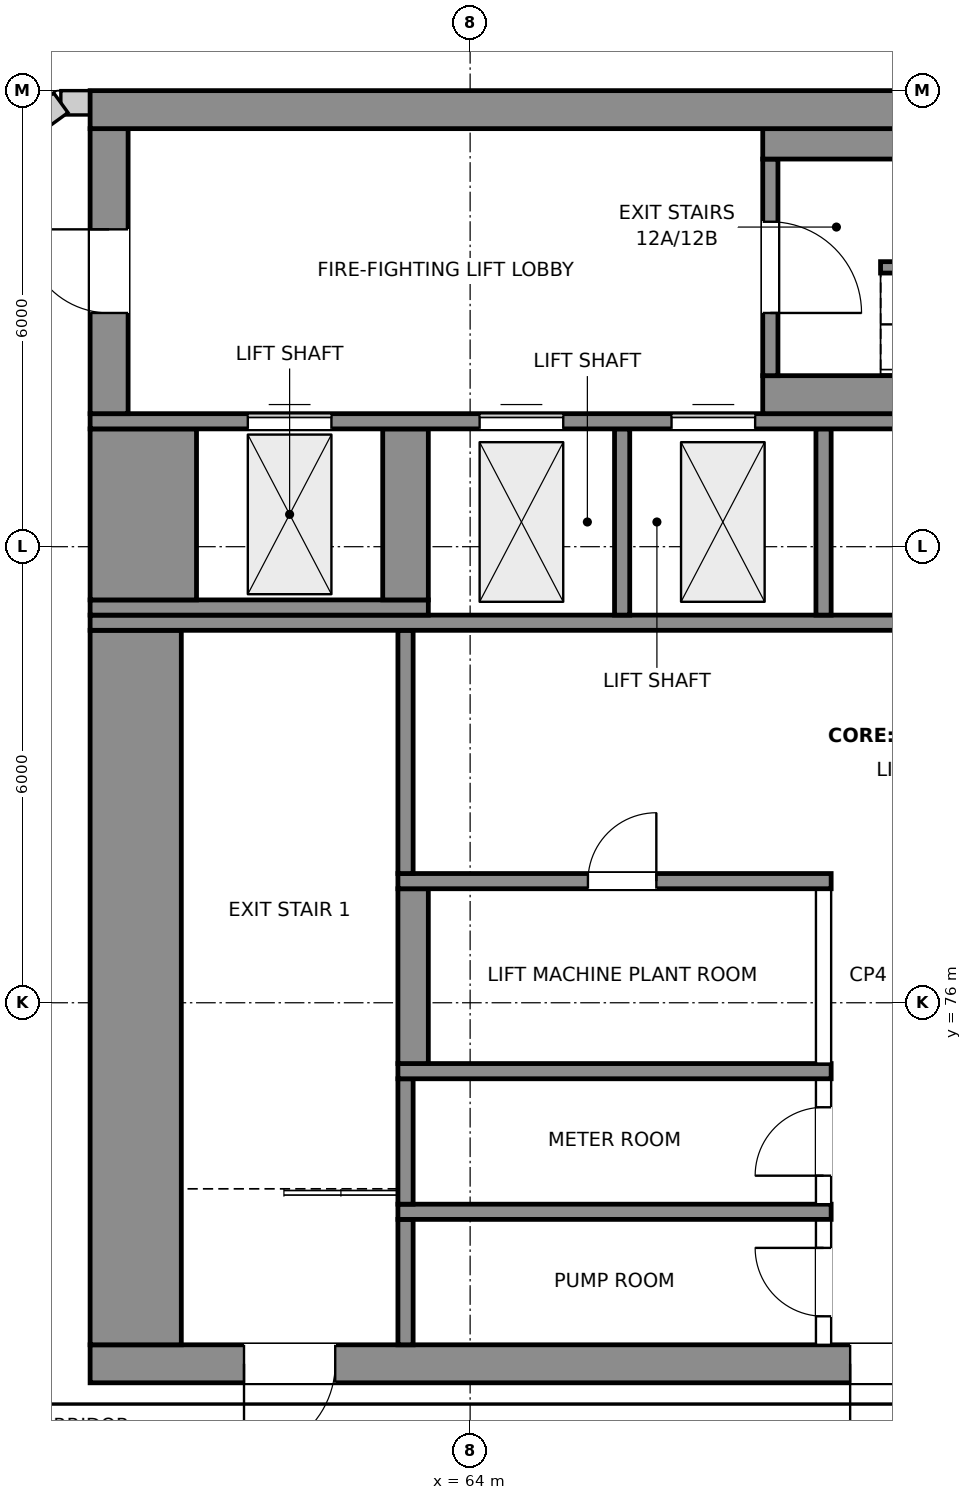
"""IFC4 building model, lengths in metres.
Left out: names, types, materials, properties, quantities, classifications, styles, units other than length and angle.
Written with IfcOpenShell. Run it as: python <this file> out.ifc"""

import sys

from ifc_helpers import new_model, si_unit, direction, frame, frame_2d, origin, place, context, subcontext, project, spatial, rectangle, extrude, element, fill, save


model = new_model("IFC4")
c1 = context("Model", 3, precision=1e-05, world=origin(), true_north=direction((0.0, 1.0)))
c2 = subcontext(c1, "Body", "Model", "MODEL_VIEW")
j1 = project(units=[si_unit("LENGTHUNIT", "METRE"), si_unit("PLANEANGLEUNIT", "RADIAN")], contexts=[c1])
p1 = place(None, origin())
s1 = spatial("IfcSite", under=j1, at=p1, CompositionType="ELEMENT")
p2 = place(p1, origin())
s2 = spatial("IfcBuilding", under=s1, at=p2, CompositionType="ELEMENT")
p3 = place(p2, frame((0.0, 0.0, 342.2)))
s3 = spatial("IfcBuildingStorey", under=s2, at=p3, CompositionType="ELEMENT", Elevation=342.2)
p4 = place(p3, frame((59.0, 87.84, 0.0), z_axis=(0.0, 0.0, 1.0), x_axis=(-1.0, 0.0, 0.0)))
e1 = element("IfcWall", 1, at=p4, inside=s3, PredefinedType="SOLIDWALL", context=c2, shape_type="SweptSolid", body=[
    extrude(rectangle(XDim=0.385, YDim=0.32, at=frame_2d((0.192, 0.0))), origin(), (0.0, 0.0, 1.0), 4.2),
])
p5 = place(p3, frame((58.615, 87.84, 0.0), z_axis=(0.0, 0.0, 1.0), x_axis=(-0.809027332235, -0.587771023186, 0.0)))
e2 = element("IfcWall", 2, at=p5, inside=s3, PredefinedType="SOLIDWALL", context=c2, shape_type="SweptSolid", body=[
    extrude(rectangle(XDim=4.53, YDim=0.32, at=frame_2d((2.265, 0.0))), origin(), (0.0, 0.0, 1.0), 4.2),
])
p6 = place(p3, frame((59.0, 71.25, 0.0), z_axis=(0.0, 0.0, 1.0), x_axis=(1.0, 0.0, 0.0)))
e3 = element("IfcWall", 3, at=p6, inside=s3, PredefinedType="SHEAR", context=c2, shape_type="SweptSolid", body=[
    extrude(rectangle(XDim=22.0, YDim=0.5, at=frame_2d((11.0, 0.0))), origin(), (0.0, 0.0, 1.0), 4.5),
])
p7 = place(p6, frame((2.025, 0.0, 0.0)))
e4 = element("IfcOpeningElement", 4, at=p7, cuts=e3, PredefinedType="OPENING", context=c2, shape_type="SweptSolid", body=[
    extrude(rectangle(XDim=1.2, YDim=2.1, at=frame_2d((0.6, 1.05))), frame((0.0, 0.26, 0.0), z_axis=(0.0, -1.0, 0.0), x_axis=(1.0, 0.0, 0.0)), (0.0, 0.0, 1.0), 0.52),
])
p8 = place(p6, frame((18.775, 0.0, 0.0)))
e5 = element("IfcOpeningElement", 5, at=p8, cuts=e3, PredefinedType="OPENING", context=c2, shape_type="SweptSolid", body=[
    extrude(rectangle(XDim=1.2, YDim=2.1, at=frame_2d((0.6, 1.05))), frame((0.0, 0.26, 0.0), z_axis=(0.0, -1.0, 0.0), x_axis=(1.0, 0.0, 0.0)), (0.0, 0.0, 1.0), 0.52),
])
p9 = place(p6, frame((10.0, 0.0, 0.0)))
e6 = element("IfcOpeningElement", 6, at=p9, cuts=e3, PredefinedType="OPENING", context=c2, shape_type="SweptSolid", body=[
    extrude(rectangle(XDim=2.0, YDim=2.1, at=frame_2d((1.0, 1.05))), frame((0.0, 0.26, 0.0), z_axis=(0.0, -1.0, 0.0), x_axis=(1.0, 0.0, 0.0)), (0.0, 0.0, 1.0), 0.52),
])
p10 = place(p3, frame((59.6, 71.5, 0.0), z_axis=(0.0, 0.0, 1.0), x_axis=(0.0, 1.0, 0.0)))
e7 = element("IfcWall", 7, at=p10, inside=s3, PredefinedType="SHEAR", context=c2, shape_type="SweptSolid", body=[
    extrude(rectangle(XDim=9.4, YDim=1.2, at=frame_2d((4.7, 0.0))), origin(), (0.0, 0.0, 1.0), 4.5),
])
p11 = place(p3, frame((63.15, 71.5, 0.0), z_axis=(0.0, 0.0, 1.0), x_axis=(0.0, 1.0, 0.0)))
e8 = element("IfcWall", 8, at=p11, inside=s3, PredefinedType="SHEAR", context=c2, shape_type="SweptSolid", body=[
    extrude(rectangle(XDim=1.65, YDim=0.2, at=frame_2d((0.825, 0.0))), origin(), (0.0, 0.0, 1.0), 4.5),
])
p12 = place(p3, frame((68.65, 71.5, 0.0), z_axis=(0.0, 0.0, 1.0), x_axis=(0.0, 1.0, 0.0)))
e9 = element("IfcWall", 9, at=p12, inside=s3, PredefinedType="PARTITIONING", context=c2, shape_type="SweptSolid", body=[
    extrude(rectangle(XDim=1.65, YDim=0.2, at=frame_2d((0.825, 0.0))), origin(), (0.0, 0.0, 1.0), 4.2),
])
p13 = place(p12, frame((0.375, 0.0, 0.0)))
e10 = element("IfcOpeningElement", 10, at=p13, cuts=e9, PredefinedType="OPENING", context=c2, shape_type="SweptSolid", body=[
    extrude(rectangle(XDim=0.9, YDim=2.1, at=frame_2d((0.45, 1.05))), frame((0.0, 0.11, 0.0), z_axis=(0.0, -1.0, 0.0), x_axis=(1.0, 0.0, 0.0)), (0.0, 0.0, 1.0), 0.22),
])
p14 = place(p3, frame((63.05, 73.25, 0.0), z_axis=(0.0, 0.0, 1.0), x_axis=(1.0, 0.0, 0.0)))
e11 = element("IfcWall", 11, at=p14, inside=s3, PredefinedType="SHEAR", context=c2, shape_type="SweptSolid", body=[
    extrude(rectangle(XDim=5.7, YDim=0.2, at=frame_2d((2.85, 0.0))), origin(), (0.0, 0.0, 1.0), 4.5),
])
p15 = place(p3, frame((63.15, 73.35, 0.0), z_axis=(0.0, 0.0, 1.0), x_axis=(0.0, 1.0, 0.0)))
e12 = element("IfcWall", 12, at=p15, inside=s3, PredefinedType="SHEAR", context=c2, shape_type="SweptSolid", body=[
    extrude(rectangle(XDim=1.65, YDim=0.2, at=frame_2d((0.825, 0.0))), origin(), (0.0, 0.0, 1.0), 4.5),
])
p16 = place(p3, frame((68.65, 73.35, 0.0), z_axis=(0.0, 0.0, 1.0), x_axis=(0.0, 1.0, 0.0)))
e13 = element("IfcWall", 13, at=p16, inside=s3, PredefinedType="PARTITIONING", context=c2, shape_type="SweptSolid", body=[
    extrude(rectangle(XDim=1.65, YDim=0.2, at=frame_2d((0.825, 0.0))), origin(), (0.0, 0.0, 1.0), 4.2),
])
p17 = place(p16, frame((0.375, 0.0, 0.0)))
e14 = element("IfcOpeningElement", 14, at=p17, cuts=e13, PredefinedType="OPENING", context=c2, shape_type="SweptSolid", body=[
    extrude(rectangle(XDim=0.9, YDim=2.1, at=frame_2d((0.45, 1.05))), frame((0.0, 0.11, 0.0), z_axis=(0.0, -1.0, 0.0), x_axis=(1.0, 0.0, 0.0)), (0.0, 0.0, 1.0), 0.22),
])
p18 = place(p3, frame((63.05, 75.1, 0.0), z_axis=(0.0, 0.0, 1.0), x_axis=(1.0, 0.0, 0.0)))
e15 = element("IfcWall", 15, at=p18, inside=s3, PredefinedType="SHEAR", context=c2, shape_type="SweptSolid", body=[
    extrude(rectangle(XDim=5.7, YDim=0.2, at=frame_2d((2.85, 0.0))), origin(), (0.0, 0.0, 1.0), 4.5),
])
p19 = place(p3, frame((63.25, 75.2, 0.0), z_axis=(0.0, 0.0, 1.0), x_axis=(0.0, 1.0, 0.0)))
e16 = element("IfcWall", 16, at=p19, inside=s3, PredefinedType="SHEAR", context=c2, shape_type="SweptSolid", body=[
    extrude(rectangle(XDim=2.3, YDim=0.4, at=frame_2d((1.15, 0.0))), origin(), (0.0, 0.0, 1.0), 4.5),
])
p20 = place(p3, frame((68.65, 75.2, 0.0), z_axis=(0.0, 0.0, 1.0), x_axis=(0.0, 1.0, 0.0)))
e17 = element("IfcWall", 17, at=p20, inside=s3, PredefinedType="PARTITIONING", context=c2, shape_type="SweptSolid", body=[
    extrude(rectangle(XDim=2.3, YDim=0.2, at=frame_2d((1.15, 0.0))), origin(), (0.0, 0.0, 1.0), 4.2),
])
p21 = place(p3, frame((63.05, 77.6, 0.0), z_axis=(0.0, 0.0, 1.0), x_axis=(1.0, 0.0, 0.0)))
e18 = element("IfcWall", 18, at=p21, inside=s3, PredefinedType="SHEAR", context=c2, shape_type="SweptSolid", body=[
    extrude(rectangle(XDim=5.7, YDim=0.2, at=frame_2d((2.85, 0.0))), origin(), (0.0, 0.0, 1.0), 4.5),
])
p22 = place(p21, frame((2.5, 0.0, 0.0)))
e19 = element("IfcOpeningElement", 19, at=p22, cuts=e18, PredefinedType="OPENING", context=c2, shape_type="SweptSolid", body=[
    extrude(rectangle(XDim=0.9, YDim=2.1, at=frame_2d((0.45, 1.05))), frame((0.0, 0.11, 0.0), z_axis=(0.0, -1.0, 0.0), x_axis=(1.0, 0.0, 0.0)), (0.0, 0.0, 1.0), 0.22),
])
p23 = place(p3, frame((63.15, 77.7, 0.0), z_axis=(0.0, 0.0, 1.0), x_axis=(0.0, 1.0, 0.0)))
e20 = element("IfcWall", 20, at=p23, inside=s3, PredefinedType="SHEAR", context=c2, shape_type="SweptSolid", body=[
    extrude(rectangle(XDim=3.2, YDim=0.2, at=frame_2d((1.6, 0.0))), origin(), (0.0, 0.0, 1.0), 4.5),
])
p24 = place(p3, frame((59.0, 81.0, 0.0), z_axis=(0.0, 0.0, 1.0), x_axis=(1.0, 0.0, 0.0)))
e21 = element("IfcWall", 21, at=p24, inside=s3, PredefinedType="SHEAR", context=c2, shape_type="SweptSolid", body=[
    extrude(rectangle(XDim=22.0, YDim=0.2, at=frame_2d((11.0, 0.0))), origin(), (0.0, 0.0, 1.0), 4.5),
])
p25 = place(p24, frame((11.85, 0.0, 0.0)))
e22 = element("IfcOpeningElement", 22, at=p25, cuts=e21, PredefinedType="OPENING", context=c2, shape_type="SweptSolid", body=[
    extrude(rectangle(XDim=0.9, YDim=2.1, at=frame_2d((0.45, 1.05))), frame((0.0, 0.11, 0.0), z_axis=(0.0, -1.0, 0.0), x_axis=(1.0, 0.0, 0.0)), (0.0, 0.0, 1.0), 0.22),
])
p26 = place(p24, frame((15.825, 0.0, 0.0)))
e23 = element("IfcOpeningElement", 23, at=p26, cuts=e21, PredefinedType="OPENING", context=c2, shape_type="SweptSolid", body=[
    extrude(rectangle(XDim=0.9, YDim=2.1, at=frame_2d((0.45, 1.05))), frame((0.0, 0.11, 0.0), z_axis=(0.0, -1.0, 0.0), x_axis=(1.0, 0.0, 0.0)), (0.0, 0.0, 1.0), 0.22),
])
p27 = place(p3, frame((59.0, 81.2, 0.0), z_axis=(0.0, 0.0, 1.0), x_axis=(1.0, 0.0, 0.0)))
e24 = element("IfcWall", 24, at=p27, inside=s3, PredefinedType="SHEAR", context=c2, shape_type="SweptSolid", body=[
    extrude(rectangle(XDim=4.45, YDim=0.2, at=frame_2d((2.225, 0.0))), origin(), (0.0, 0.0, 1.0), 4.5),
])
for number, where, z_axis, x_axis in (
    (25, (66.0, 81.1, 0.0), (0.0, 0.0, 1.0), (0.0, 1.0, 0.0)),
    (26, (68.65, 81.1, 0.0), (0.0, 0.0, 1.0), (0.0, 1.0, 0.0)),
):
    element("IfcWall", number, at=place(p3, frame(where, z_axis=z_axis, x_axis=x_axis)), inside=s3, PredefinedType="SHEAR", context=c2, shape_type="SweptSolid", body=[
        extrude(rectangle(XDim=2.45, YDim=0.2, at=frame_2d((1.225, 0.0))), origin(), (0.0, 0.0, 1.0), 4.5),
    ])
p28 = place(p3, frame((59.7, 81.3, 0.0), z_axis=(0.0, 0.0, 1.0), x_axis=(0.0, 1.0, 0.0)))
e27 = element("IfcWall", 27, at=p28, inside=s3, PredefinedType="SHEAR", context=c2, shape_type="SweptSolid", body=[
    extrude(rectangle(XDim=2.25, YDim=1.4, at=frame_2d((1.125, 0.0))), origin(), (0.0, 0.0, 1.0), 4.5),
])
p29 = place(p3, frame((63.15, 81.3, 0.0), z_axis=(0.0, 0.0, 1.0), x_axis=(0.0, 1.0, 0.0)))
e28 = element("IfcWall", 28, at=p29, inside=s3, PredefinedType="SHEAR", context=c2, shape_type="SweptSolid", body=[
    extrude(rectangle(XDim=2.25, YDim=0.6, at=frame_2d((1.125, 0.0))), origin(), (0.0, 0.0, 1.0), 4.5),
])
p30 = place(p3, frame((59.0, 83.65, 0.0), z_axis=(0.0, 0.0, 1.0), x_axis=(1.0, 0.0, 0.0)))
e29 = element("IfcWall", 29, at=p30, inside=s3, PredefinedType="SHEAR", context=c2, shape_type="SweptSolid", body=[
    extrude(rectangle(XDim=22.0, YDim=0.2, at=frame_2d((11.0, 0.0))), origin(), (0.0, 0.0, 1.0), 4.5),
])
p31 = place(p30, frame((5.125, 0.0, 0.0)))
e30 = element("IfcOpeningElement", 30, at=p31, cuts=e29, PredefinedType="OPENING", context=c2, shape_type="SweptSolid", body=[
    extrude(rectangle(XDim=1.1, YDim=2.1, at=frame_2d((0.55, 1.05))), frame((0.0, 0.11, 0.0), z_axis=(0.0, -1.0, 0.0), x_axis=(1.0, 0.0, 0.0)), (0.0, 0.0, 1.0), 0.22),
])
p32 = place(p30, frame((7.65, 0.0, 0.0)))
e31 = element("IfcOpeningElement", 31, at=p32, cuts=e29, PredefinedType="OPENING", context=c2, shape_type="SweptSolid", body=[
    extrude(rectangle(XDim=1.1, YDim=2.1, at=frame_2d((0.55, 1.05))), frame((0.0, 0.11, 0.0), z_axis=(0.0, -1.0, 0.0), x_axis=(1.0, 0.0, 0.0)), (0.0, 0.0, 1.0), 0.22),
])
p33 = place(p30, frame((18.775, 0.0, 0.0)))
e32 = element("IfcOpeningElement", 32, at=p33, cuts=e29, PredefinedType="OPENING", context=c2, shape_type="SweptSolid", body=[
    extrude(rectangle(XDim=1.2, YDim=2.1, at=frame_2d((0.6, 1.05))), frame((0.0, 0.11, 0.0), z_axis=(0.0, -1.0, 0.0), x_axis=(1.0, 0.0, 0.0)), (0.0, 0.0, 1.0), 0.22),
])
p34 = place(p30, frame((2.075, 0.0, 0.0)))
e33 = element("IfcOpeningElement", 33, at=p34, cuts=e29, PredefinedType="OPENING", context=c2, shape_type="SweptSolid", body=[
    extrude(rectangle(XDim=1.1, YDim=2.1, at=frame_2d((0.55, 1.05))), frame((0.0, 0.11, 0.0), z_axis=(0.0, -1.0, 0.0), x_axis=(1.0, 0.0, 0.0)), (0.0, 0.0, 1.0), 0.22),
])
p35 = place(p3, frame((59.25, 83.75, 0.0), z_axis=(0.0, 0.0, 1.0), x_axis=(0.0, 1.0, 0.0)))
e34 = element("IfcWall", 34, at=p35, inside=s3, PredefinedType="SHEAR", context=c2, shape_type="SweptSolid", body=[
    extrude(rectangle(XDim=3.75, YDim=0.5, at=frame_2d((1.875, 0.0))), origin(), (0.0, 0.0, 1.0), 4.5),
])
p36 = place(p35, frame((1.325, 0.0, 0.0)))
e35 = element("IfcOpeningElement", 35, at=p36, cuts=e34, PredefinedType="OPENING", context=c2, shape_type="SweptSolid", body=[
    extrude(rectangle(XDim=1.1, YDim=2.1, at=frame_2d((0.55, 1.05))), frame((0.0, 0.26, 0.0), z_axis=(0.0, -1.0, 0.0), x_axis=(1.0, 0.0, 0.0)), (0.0, 0.0, 1.0), 0.52),
])
p37 = place(p3, frame((67.85, 84.0, 0.0), z_axis=(0.0, 0.0, 1.0), x_axis=(1.0, 0.0, 0.0)))
e36 = element("IfcWall", 36, at=p37, inside=s3, PredefinedType="SHEAR", context=c2, shape_type="SweptSolid", body=[
    extrude(rectangle(XDim=9.1, YDim=0.5, at=frame_2d((4.55, 0.0))), origin(), (0.0, 0.0, 1.0), 4.5),
])
p38 = place(p3, frame((67.95, 84.25, 0.0), z_axis=(0.0, 0.0, 1.0), x_axis=(0.0, 1.0, 0.0)))
e37 = element("IfcWall", 37, at=p38, inside=s3, PredefinedType="SHEAR", context=c2, shape_type="SweptSolid", body=[
    extrude(rectangle(XDim=2.85, YDim=0.2, at=frame_2d((1.425, 0.0))), origin(), (0.0, 0.0, 1.0), 4.5),
])
p39 = place(p38, frame((0.825, 0.0, 0.0)))
e38 = element("IfcOpeningElement", 38, at=p39, cuts=e37, PredefinedType="OPENING", context=c2, shape_type="SweptSolid", body=[
    extrude(rectangle(XDim=1.2, YDim=2.1, at=frame_2d((0.6, 1.05))), frame((0.0, 0.11, 0.0), z_axis=(0.0, -1.0, 0.0), x_axis=(1.0, 0.0, 0.0)), (0.0, 0.0, 1.0), 0.22),
])
p40 = place(p3, frame((67.85, 87.3, 0.0), z_axis=(0.0, 0.0, 1.0), x_axis=(1.0, 0.0, 0.0)))
e39 = element("IfcWall", 39, at=p40, inside=s3, PredefinedType="SHEAR", context=c2, shape_type="SweptSolid", body=[
    extrude(rectangle(XDim=9.1, YDim=0.4, at=frame_2d((4.55, 0.0))), origin(), (0.0, 0.0, 1.0), 4.5),
])
p41 = place(p3, frame((59.0, 87.75, 0.0), z_axis=(0.0, 0.0, 1.0), x_axis=(1.0, 0.0, 0.0)))
e40 = element("IfcWall", 40, at=p41, inside=s3, PredefinedType="SHEAR", context=c2, shape_type="SweptSolid", body=[
    extrude(rectangle(XDim=22.0, YDim=0.5, at=frame_2d((11.0, 0.0))), origin(), (0.0, 0.0, 1.0), 4.5),
])
p42 = place(p3, frame((69.4, 85.675, 0.0), z_axis=(0.0, 0.0, 1.0), x_axis=(1.0, 0.0, 0.0)))
e41 = element("IfcWall", 41, at=p42, inside=s3, PredefinedType="SHEAR", context=c2, shape_type="SweptSolid", body=[
    extrude(rectangle(XDim=6.0, YDim=0.15, at=frame_2d((3.0, 0.0))), origin(), (0.0, 0.0, 1.0), 4.5),
])
p43 = place(p7, frame((1.2, 0.0, 0.0), z_axis=(0.0, 0.0, 1.0), x_axis=(-1.0, 0.0, 0.0)))
e42 = element("IfcDoor", 42, at=p43, inside=s3, OperationType="SINGLE_SWING_RIGHT", PredefinedType="DOOR", context=c2, shape_type="SweptSolid", body=[
    extrude(rectangle(XDim=1.2, YDim=2.1, at=frame_2d((0.6, 1.05))), frame((0.0, 0.025, 0.0), z_axis=(0.0, -1.0, 0.0), x_axis=(1.0, 0.0, 0.0)), (0.0, 0.0, 1.0), 0.05),
])
fill(e4, e42)
p44 = place(p39, frame((1.2, 0.0, 0.0), z_axis=(0.0, 0.0, 1.0), x_axis=(-1.0, 0.0, 0.0)))
e43 = element("IfcDoor", 43, at=p44, inside=s3, OperationType="SINGLE_SWING_RIGHT", PredefinedType="DOOR", context=c2, shape_type="SweptSolid", body=[
    extrude(rectangle(XDim=1.2, YDim=2.1, at=frame_2d((0.6, 1.05))), frame((0.0, 0.025, 0.0), z_axis=(0.0, -1.0, 0.0), x_axis=(1.0, 0.0, 0.0)), (0.0, 0.0, 1.0), 0.05),
])
fill(e38, e43)
p45 = place(p9, frame((2.0, 0.0, 0.0), z_axis=(0.0, 0.0, 1.0), x_axis=(-1.0, 0.0, 0.0)))
e44 = element("IfcDoor", 44, at=p45, inside=s3, OperationType="DOUBLE_DOOR_SINGLE_SWING", PredefinedType="DOOR", context=c2, shape_type="SweptSolid", body=[
    extrude(rectangle(XDim=2.0, YDim=2.1, at=frame_2d((1.0, 1.05))), frame((0.0, 0.025, 0.0), z_axis=(0.0, -1.0, 0.0), x_axis=(1.0, 0.0, 0.0)), (0.0, 0.0, 1.0), 0.05),
])
fill(e6, e44)
p46 = place(p13, origin())
e45 = element("IfcDoor", 45, at=p46, inside=s3, OperationType="SINGLE_SWING_RIGHT", PredefinedType="DOOR", context=c2, shape_type="SweptSolid", body=[
    extrude(rectangle(XDim=0.9, YDim=2.1, at=frame_2d((0.45, 1.05))), frame((0.0, 0.025, 0.0), z_axis=(0.0, -1.0, 0.0), x_axis=(1.0, 0.0, 0.0)), (0.0, 0.0, 1.0), 0.05),
])
fill(e10, e45)
p47 = place(p17, origin())
e46 = element("IfcDoor", 46, at=p47, inside=s3, OperationType="SINGLE_SWING_LEFT", PredefinedType="DOOR", context=c2, shape_type="SweptSolid", body=[
    extrude(rectangle(XDim=0.9, YDim=2.1, at=frame_2d((0.45, 1.05))), frame((0.0, 0.025, 0.0), z_axis=(0.0, -1.0, 0.0), x_axis=(1.0, 0.0, 0.0)), (0.0, 0.0, 1.0), 0.05),
])
fill(e14, e46)
p48 = place(p36, origin())
e47 = element("IfcDoor", 47, at=p48, inside=s3, OperationType="SINGLE_SWING_RIGHT", PredefinedType="DOOR", context=c2, shape_type="SweptSolid", body=[
    extrude(rectangle(XDim=1.1, YDim=2.1, at=frame_2d((0.55, 1.05))), frame((0.0, 0.025, 0.0), z_axis=(0.0, -1.0, 0.0), x_axis=(1.0, 0.0, 0.0)), (0.0, 0.0, 1.0), 0.05),
])
fill(e35, e47)
p49 = place(p31, origin())
e48 = element("IfcDoor", 48, at=p49, inside=s3, OperationType="DOUBLE_DOOR_SLIDING", PredefinedType="DOOR", context=c2, shape_type="SweptSolid", body=[
    extrude(rectangle(XDim=1.1, YDim=2.1, at=frame_2d((0.55, 1.05))), frame((0.0, 0.025, 0.0), z_axis=(0.0, -1.0, 0.0), x_axis=(1.0, 0.0, 0.0)), (0.0, 0.0, 1.0), 0.05),
])
fill(e30, e48)
p50 = place(p32, origin())
e49 = element("IfcDoor", 49, at=p50, inside=s3, OperationType="DOUBLE_DOOR_SLIDING", PredefinedType="DOOR", context=c2, shape_type="SweptSolid", body=[
    extrude(rectangle(XDim=1.1, YDim=2.1, at=frame_2d((0.55, 1.05))), frame((0.0, 0.025, 0.0), z_axis=(0.0, -1.0, 0.0), x_axis=(1.0, 0.0, 0.0)), (0.0, 0.0, 1.0), 0.05),
])
fill(e31, e49)
p51 = place(p34, origin())
e50 = element("IfcDoor", 50, at=p51, inside=s3, OperationType="DOUBLE_DOOR_SLIDING", PredefinedType="DOOR", context=c2, shape_type="SweptSolid", body=[
    extrude(rectangle(XDim=1.1, YDim=2.1, at=frame_2d((0.55, 1.05))), frame((0.0, 0.025, 0.0), z_axis=(0.0, -1.0, 0.0), x_axis=(1.0, 0.0, 0.0)), (0.0, 0.0, 1.0), 0.05),
])
fill(e33, e50)
p52 = place(p22, origin())
e51 = element("IfcDoor", 51, at=p52, inside=s3, OperationType="SINGLE_SWING_RIGHT", PredefinedType="DOOR", context=c2, shape_type="SweptSolid", body=[
    extrude(rectangle(XDim=0.9, YDim=2.1, at=frame_2d((0.45, 1.05))), frame((0.0, 0.025, 0.0), z_axis=(0.0, -1.0, 0.0), x_axis=(1.0, 0.0, 0.0)), (0.0, 0.0, 1.0), 0.05),
])
fill(e19, e51)
save(model, sys.argv[1])
